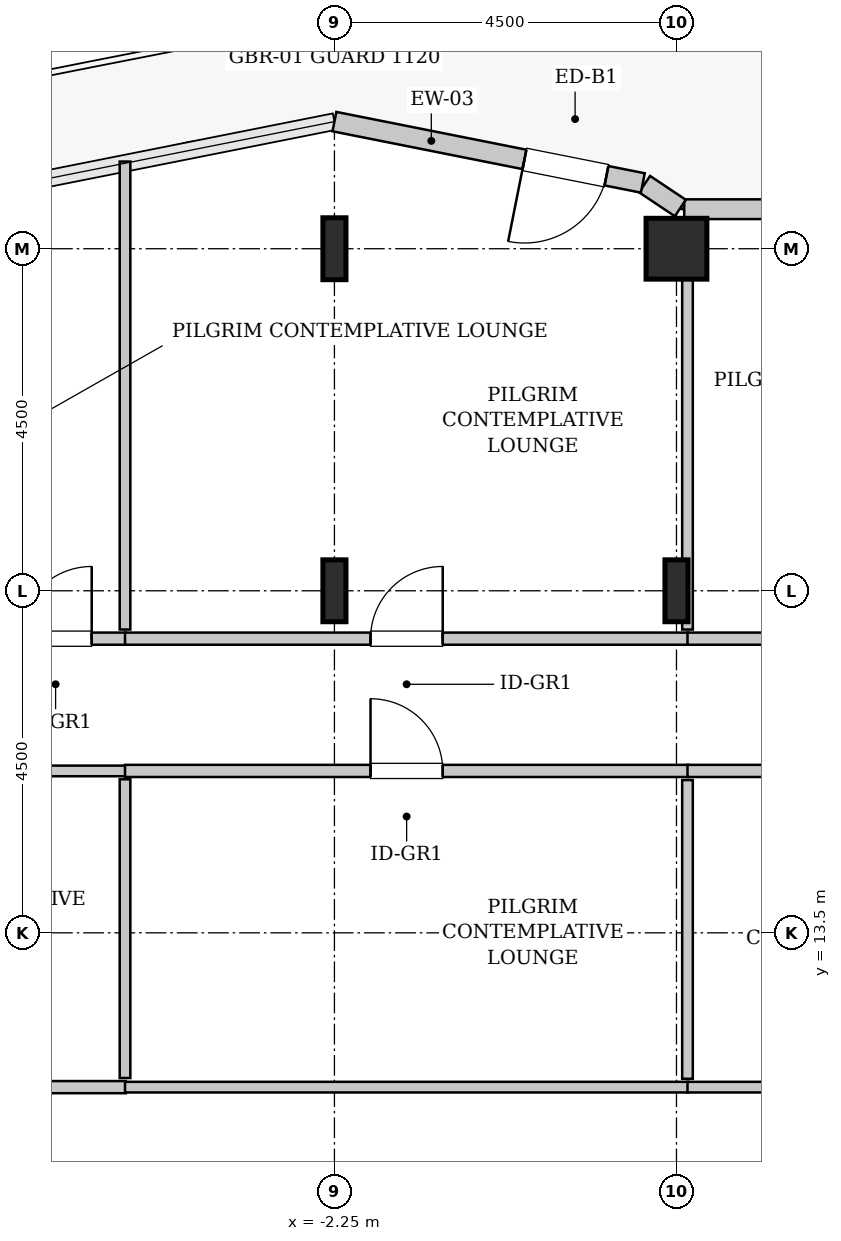
"""IFC4 building model, lengths in metres.
Left out: names, types, materials, properties, quantities, classifications, styles, units other than length and angle.
Written with IfcOpenShell. Run it as: python <this file> out.ifc"""

import sys

from ifc_helpers import new_model, si_unit, direction, frame, frame_2d, origin, origin_2d, place, context, subcontext, project, spatial, rectangle, hollow_rectangle, i_section, extrude, source, transform, mapped, element, fill, save


model = new_model("IFC4")
c1 = context("Model", 3, precision=1e-05, world=origin(), true_north=direction((0.0, 1.0)))
c2 = subcontext(c1, "Body", "Model", "MODEL_VIEW")
j1 = project(units=[si_unit("LENGTHUNIT", "METRE"), si_unit("PLANEANGLEUNIT", "RADIAN")], contexts=[c1])
p1 = place(None, origin())
s1 = spatial("IfcSite", under=j1, at=p1, CompositionType="ELEMENT")
p2 = place(p1, origin())
s2 = spatial("IfcBuilding", under=s1, at=p2, CompositionType="ELEMENT")
p3 = place(p2, frame((0.0, 0.0, 148.8)))
s3 = spatial("IfcBuildingStorey", under=s2, at=p3, CompositionType="ELEMENT", Elevation=148.8)
m1 = source(origin(), c2, "Body", "SweptSolid", [
    extrude(i_section(OverallWidth=0.303, OverallDepth=0.814, WebThickness=0.021, FlangeThickness=0.04, FilletRadius=0.03, at=origin_2d()), origin(), (0.0, 0.0, 1.0), 3.8),
])
for number, where, z_axis, x_axis in (
    (1, (-2.25, 18.0, 0.0), (0.0, 0.0, 1.0), (1.0, 0.0, 0.0)),
    (2, (-2.25, 22.5, 0.0), (0.0, 0.0, 1.0), (1.0, 0.0, 0.0)),
    (3, (2.25, 18.0, 0.0), (0.0, 0.0, 1.0), (1.0, 0.0, 0.0)),
):
    element("IfcColumn", number, at=place(p3, frame(where, z_axis=z_axis, x_axis=x_axis)), inside=s3, PredefinedType="COLUMN", context=c2, shape_type="MappedRepresentation", body=[
        mapped(m1, transform((0.0, 0.0, 0.0), x_axis=(1.0, 0.0, 0.0), y_axis=(0.0, 1.0, 0.0), z_axis=(0.0, 0.0, 1.0), scale=1.0)),
    ])
m2 = source(origin(), c2, "Body", "SweptSolid", [
    extrude(hollow_rectangle(XDim=0.8, YDim=0.8, WallThickness=0.04, InnerFilletRadius=0.04, OuterFilletRadius=0.08, at=origin_2d()), origin(), (0.0, 0.0, 1.0), 3.8),
])
p4 = place(p3, frame((2.25, 22.5, 0.0), z_axis=(0.0, 0.0, 1.0), x_axis=(1.0, 0.0, 0.0)))
e4 = element("IfcColumn", 4, at=p4, inside=s3, PredefinedType="COLUMN", context=c2, shape_type="MappedRepresentation", body=[
    mapped(m2, transform((0.0, 0.0, 0.0), x_axis=(1.0, 0.0, 0.0), y_axis=(0.0, 1.0, 0.0), z_axis=(0.0, 0.0, 1.0), scale=1.0)),
])
m3 = source(origin(), c2, "Body", "SweptSolid", [
    extrude(rectangle(XDim=1.37, YDim=0.26, at=frame_2d((0.685, 0.0))), origin(), (0.0, 0.0, 1.0), 3.55),
])
p5 = place(p3, frame((3.722, 23.02, 0.0), z_axis=(0.0, 0.0, 1.0), x_axis=(-1.0, 0.0, 0.0)))
e5 = element("IfcWall", 5, at=p5, inside=s3, PredefinedType="SOLIDWALL", context=c2, shape_type="MappedRepresentation", body=[
    mapped(m3, transform((0.0, 0.0, 0.0), x_axis=(1.0, 0.0, 0.0), y_axis=(0.0, 1.0, 0.0), z_axis=(0.0, 0.0, 1.0), scale=1.0)),
])
m4 = source(origin(), c2, "Body", "SweptSolid", [
    extrude(rectangle(XDim=0.565, YDim=0.26, at=frame_2d((0.283, 0.0))), origin(), (0.0, 0.0, 1.0), 3.55),
])
p6 = place(p3, frame((2.301, 23.036, 0.0), z_axis=(0.0, 0.0, 1.0), x_axis=(-0.831651492666, 0.555297933317, 0.0)))
e6 = element("IfcWall", 6, at=p6, inside=s3, PredefinedType="SOLIDWALL", context=c2, shape_type="MappedRepresentation", body=[
    mapped(m4, transform((0.0, 0.0, 0.0), x_axis=(1.0, 0.0, 0.0), y_axis=(0.0, 1.0, 0.0), z_axis=(0.0, 0.0, 1.0), scale=1.0)),
])
m5 = source(origin(), c2, "Body", "SweptSolid", [
    extrude(rectangle(XDim=4.137, YDim=0.26, at=frame_2d((2.068, 0.0))), origin(), (0.0, 0.0, 1.0), 3.55),
])
p7 = place(p3, frame((1.807, 23.365, 0.0), z_axis=(0.0, 0.0, 1.0), x_axis=(-0.980782170794, 0.195105954428, 0.0)))
e7 = element("IfcWall", 7, at=p7, inside=s3, PredefinedType="SOLIDWALL", context=c2, shape_type="MappedRepresentation", body=[
    mapped(m5, transform((0.0, 0.0, 0.0), x_axis=(1.0, 0.0, 0.0), y_axis=(0.0, 1.0, 0.0), z_axis=(0.0, 0.0, 1.0), scale=1.0)),
])
p8 = place(p7, frame((0.488, 0.0, 0.0)))
e8 = element("IfcOpeningElement", 8, at=p8, cuts=e7, PredefinedType="OPENING", context=c2, shape_type="SweptSolid", body=[
    extrude(rectangle(XDim=1.1, YDim=2.2, at=frame_2d((0.55, 1.1))), frame((0.0, 0.14, 0.0), z_axis=(0.0, -1.0, 0.0), x_axis=(1.0, 0.0, 0.0)), (0.0, 0.0, 1.0), 0.28),
])
m6 = source(origin(), c2, "Body", "SweptSolid", [
    extrude(rectangle(XDim=7.015, YDim=0.16, at=frame_2d((3.507, 0.0))), origin(), (0.0, 0.0, 1.0), 3.535),
])
p9 = place(p3, frame((-12.01, 11.47, 0.0), z_axis=(0.0, 0.0, 1.0), x_axis=(1.0, 0.0, 0.0)))
e9 = element("IfcWall", 9, at=p9, inside=s3, PredefinedType="PARTITIONING", context=c2, shape_type="MappedRepresentation", body=[
    mapped(m6, transform((0.0, 0.0, 0.0), x_axis=(1.0, 0.0, 0.0), y_axis=(0.0, 1.0, 0.0), z_axis=(0.0, 0.0, 1.0), scale=1.0)),
])
p10 = place(p9, frame((3.032, 0.0, 0.0)))
e10 = element("IfcOpeningElement", 10, at=p10, cuts=e9, PredefinedType="OPENING", context=c2, shape_type="SweptSolid", body=[
    extrude(rectangle(XDim=0.95, YDim=2.1, at=frame_2d((0.475, 1.05))), frame((0.0, 0.09, 0.0), z_axis=(0.0, -1.0, 0.0), x_axis=(1.0, 0.0, 0.0)), (0.0, 0.0, 1.0), 0.18),
])
m7 = source(origin(), c2, "Body", "SweptSolid", [
    extrude(rectangle(XDim=7.015, YDim=0.14, at=frame_2d((3.507, 0.0))), origin(), (0.0, 0.0, 1.0), 3.535),
])
p11 = place(p3, frame((-12.01, 15.63, 0.0), z_axis=(0.0, 0.0, 1.0), x_axis=(1.0, 0.0, 0.0)))
e11 = element("IfcWall", 11, at=p11, inside=s3, PredefinedType="PARTITIONING", context=c2, shape_type="MappedRepresentation", body=[
    mapped(m7, transform((0.0, 0.0, 0.0), x_axis=(1.0, 0.0, 0.0), y_axis=(0.0, 1.0, 0.0), z_axis=(0.0, 0.0, 1.0), scale=1.0)),
])
m8 = source(origin(), c2, "Body", "SweptSolid", [
    extrude(rectangle(XDim=3.93, YDim=0.14, at=frame_2d((1.965, 0.0))), origin(), (0.0, 0.0, 1.0), 3.535),
])
p12 = place(p3, frame((-5.005, 11.59, 0.0), z_axis=(0.0, 0.0, 1.0), x_axis=(0.0, 1.0, 0.0)))
e12 = element("IfcWall", 12, at=p12, inside=s3, PredefinedType="PARTITIONING", context=c2, shape_type="MappedRepresentation", body=[
    mapped(m8, transform((0.0, 0.0, 0.0), x_axis=(1.0, 0.0, 0.0), y_axis=(0.0, 1.0, 0.0), z_axis=(0.0, 0.0, 1.0), scale=1.0)),
])
m9 = source(origin(), c2, "Body", "SweptSolid", [
    extrude(rectangle(XDim=2.445, YDim=0.16, at=frame_2d((1.222, 0.0))), origin(), (0.0, 0.0, 1.0), 3.535),
])
p13 = place(p3, frame((-7.44, 17.37, 0.0), z_axis=(0.0, 0.0, 1.0), x_axis=(1.0, 0.0, 0.0)))
e13 = element("IfcWall", 13, at=p13, inside=s3, PredefinedType="PARTITIONING", context=c2, shape_type="MappedRepresentation", body=[
    mapped(m9, transform((0.0, 0.0, 0.0), x_axis=(1.0, 0.0, 0.0), y_axis=(0.0, 1.0, 0.0), z_axis=(0.0, 0.0, 1.0), scale=1.0)),
])
p14 = place(p13, frame((1.047, 0.0, 0.0)))
e14 = element("IfcOpeningElement", 14, at=p14, cuts=e13, PredefinedType="OPENING", context=c2, shape_type="SweptSolid", body=[
    extrude(rectangle(XDim=0.95, YDim=2.1, at=frame_2d((0.475, 1.05))), frame((0.0, 0.09, 0.0), z_axis=(0.0, -1.0, 0.0), x_axis=(1.0, 0.0, 0.0)), (0.0, 0.0, 1.0), 0.18),
])
m10 = source(origin(), c2, "Body", "SweptSolid", [
    extrude(rectangle(XDim=6.157, YDim=0.14, at=frame_2d((3.078, 0.0))), origin(), (0.0, 0.0, 1.0), 3.535),
])
p15 = place(p3, frame((-5.005, 17.49, 0.0), z_axis=(0.0, 0.0, 1.0), x_axis=(0.0, 1.0, 0.0)))
e15 = element("IfcWall", 15, at=p15, inside=s3, PredefinedType="PARTITIONING", context=c2, shape_type="MappedRepresentation", body=[
    mapped(m10, transform((0.0, 0.0, 0.0), x_axis=(1.0, 0.0, 0.0), y_axis=(0.0, 1.0, 0.0), z_axis=(0.0, 0.0, 1.0), scale=1.0)),
])
m11 = source(origin(), c2, "Body", "SweptSolid", [
    extrude(rectangle(XDim=7.41, YDim=0.16, at=frame_2d((3.705, 0.0))), origin(), (0.0, 0.0, 1.0), 3.535),
])
p16 = place(p3, frame((-5.005, 17.37, 0.0), z_axis=(0.0, 0.0, 1.0), x_axis=(1.0, 0.0, 0.0)))
e16 = element("IfcWall", 16, at=p16, inside=s3, PredefinedType="PARTITIONING", context=c2, shape_type="MappedRepresentation", body=[
    mapped(m11, transform((0.0, 0.0, 0.0), x_axis=(1.0, 0.0, 0.0), y_axis=(0.0, 1.0, 0.0), z_axis=(0.0, 0.0, 1.0), scale=1.0)),
])
p17 = place(p16, frame((3.23, 0.0, 0.0)))
e17 = element("IfcOpeningElement", 17, at=p17, cuts=e16, PredefinedType="OPENING", context=c2, shape_type="SweptSolid", body=[
    extrude(rectangle(XDim=0.95, YDim=2.1, at=frame_2d((0.475, 1.05))), frame((0.0, 0.09, 0.0), z_axis=(0.0, -1.0, 0.0), x_axis=(1.0, 0.0, 0.0)), (0.0, 0.0, 1.0), 0.18),
])
m12 = source(origin(), c2, "Body", "SweptSolid", [
    extrude(rectangle(XDim=5.36, YDim=0.14, at=frame_2d((2.68, 0.0))), origin(), (0.0, 0.0, 1.0), 2.875),
])
p18 = place(p3, frame((2.395, 17.49, 0.0), z_axis=(0.0, 0.0, 1.0), x_axis=(0.0, 1.0, 0.0)))
e18 = element("IfcWall", 18, at=p18, inside=s3, PredefinedType="PARTITIONING", context=c2, shape_type="MappedRepresentation", body=[
    mapped(m12, transform((0.0, 0.0, 0.0), x_axis=(1.0, 0.0, 0.0), y_axis=(0.0, 1.0, 0.0), z_axis=(0.0, 0.0, 1.0), scale=1.0)),
])
p19 = place(p3, frame((-5.005, 15.63, 0.0), z_axis=(0.0, 0.0, 1.0), x_axis=(1.0, 0.0, 0.0)))
e19 = element("IfcWall", 19, at=p19, inside=s3, PredefinedType="PARTITIONING", context=c2, shape_type="MappedRepresentation", body=[
    mapped(m11, transform((0.0, 0.0, 0.0), x_axis=(1.0, 0.0, 0.0), y_axis=(0.0, 1.0, 0.0), z_axis=(0.0, 0.0, 1.0), scale=1.0)),
])
p20 = place(p19, frame((3.23, 0.0, 0.0)))
e20 = element("IfcOpeningElement", 20, at=p20, cuts=e19, PredefinedType="OPENING", context=c2, shape_type="SweptSolid", body=[
    extrude(rectangle(XDim=0.95, YDim=2.1, at=frame_2d((0.475, 1.05))), frame((0.0, 0.09, 0.0), z_axis=(0.0, -1.0, 0.0), x_axis=(1.0, 0.0, 0.0)), (0.0, 0.0, 1.0), 0.18),
])
m13 = source(origin(), c2, "Body", "SweptSolid", [
    extrude(rectangle(XDim=7.41, YDim=0.14, at=frame_2d((3.705, 0.0))), origin(), (0.0, 0.0, 1.0), 3.535),
])
p21 = place(p3, frame((-5.005, 11.47, 0.0), z_axis=(0.0, 0.0, 1.0), x_axis=(1.0, 0.0, 0.0)))
e21 = element("IfcWall", 21, at=p21, inside=s3, PredefinedType="PARTITIONING", context=c2, shape_type="MappedRepresentation", body=[
    mapped(m13, transform((0.0, 0.0, 0.0), x_axis=(1.0, 0.0, 0.0), y_axis=(0.0, 1.0, 0.0), z_axis=(0.0, 0.0, 1.0), scale=1.0)),
])
p22 = place(p3, frame((2.395, 11.58, 0.0), z_axis=(0.0, 0.0, 1.0), x_axis=(0.0, 1.0, 0.0)))
e22 = element("IfcWall", 22, at=p22, inside=s3, PredefinedType="PARTITIONING", context=c2, shape_type="MappedRepresentation", body=[
    mapped(m8, transform((0.0, 0.0, 0.0), x_axis=(1.0, 0.0, 0.0), y_axis=(0.0, 1.0, 0.0), z_axis=(0.0, 0.0, 1.0), scale=1.0)),
])
m14 = source(origin(), c2, "Body", "SweptSolid", [
    extrude(rectangle(XDim=5.81, YDim=0.16, at=frame_2d((2.905, 0.0))), origin(), (0.0, 0.0, 1.0), 3.535),
])
p23 = place(p3, frame((2.395, 17.37, 0.0), z_axis=(0.0, 0.0, 1.0), x_axis=(1.0, 0.0, 0.0)))
e23 = element("IfcWall", 23, at=p23, inside=s3, PredefinedType="PARTITIONING", context=c2, shape_type="MappedRepresentation", body=[
    mapped(m14, transform((0.0, 0.0, 0.0), x_axis=(1.0, 0.0, 0.0), y_axis=(0.0, 1.0, 0.0), z_axis=(0.0, 0.0, 1.0), scale=1.0)),
])
p24 = place(p23, frame((2.43, 0.0, 0.0)))
e24 = element("IfcOpeningElement", 24, at=p24, cuts=e23, PredefinedType="OPENING", context=c2, shape_type="SweptSolid", body=[
    extrude(rectangle(XDim=0.95, YDim=2.1, at=frame_2d((0.475, 1.05))), frame((0.0, 0.09, 0.0), z_axis=(0.0, -1.0, 0.0), x_axis=(1.0, 0.0, 0.0)), (0.0, 0.0, 1.0), 0.18),
])
p25 = place(p3, frame((2.395, 15.63, 0.0), z_axis=(0.0, 0.0, 1.0), x_axis=(1.0, 0.0, 0.0)))
e25 = element("IfcWall", 25, at=p25, inside=s3, PredefinedType="PARTITIONING", context=c2, shape_type="MappedRepresentation", body=[
    mapped(m14, transform((0.0, 0.0, 0.0), x_axis=(1.0, 0.0, 0.0), y_axis=(0.0, 1.0, 0.0), z_axis=(0.0, 0.0, 1.0), scale=1.0)),
])
p26 = place(p25, frame((2.43, 0.0, 0.0)))
e26 = element("IfcOpeningElement", 26, at=p26, cuts=e25, PredefinedType="OPENING", context=c2, shape_type="SweptSolid", body=[
    extrude(rectangle(XDim=0.95, YDim=2.1, at=frame_2d((0.475, 1.05))), frame((0.0, 0.09, 0.0), z_axis=(0.0, -1.0, 0.0), x_axis=(1.0, 0.0, 0.0)), (0.0, 0.0, 1.0), 0.18),
])
m15 = source(origin(), c2, "Body", "SweptSolid", [
    extrude(rectangle(XDim=5.81, YDim=0.14, at=frame_2d((2.905, 0.0))), origin(), (0.0, 0.0, 1.0), 3.535),
])
p27 = place(p3, frame((2.395, 11.47, 0.0), z_axis=(0.0, 0.0, 1.0), x_axis=(1.0, 0.0, 0.0)))
e27 = element("IfcWall", 27, at=p27, inside=s3, PredefinedType="PARTITIONING", context=c2, shape_type="MappedRepresentation", body=[
    mapped(m15, transform((0.0, 0.0, 0.0), x_axis=(1.0, 0.0, 0.0), y_axis=(0.0, 1.0, 0.0), z_axis=(0.0, 0.0, 1.0), scale=1.0)),
])
m16 = source(origin(), c2, "Body", "SweptSolid", [
    extrude(rectangle(XDim=1.1, YDim=2.2, at=frame_2d((0.55, 1.1))), frame((0.0, 0.025, 0.0), z_axis=(0.0, -1.0, 0.0), x_axis=(1.0, 0.0, 0.0)), (0.0, 0.0, 1.0), 0.05),
])
p28 = place(p8, origin())
e28 = element("IfcDoor", 28, at=p28, inside=s3, OperationType="SINGLE_SWING_RIGHT", PredefinedType="DOOR", context=c2, shape_type="MappedRepresentation", body=[
    mapped(m16, transform((0.0, 0.0, 0.0), x_axis=(1.0, 0.0, 0.0), y_axis=(0.0, 1.0, 0.0), z_axis=(0.0, 0.0, 1.0), scale=1.0)),
])
fill(e8, e28)
m17 = source(origin(), c2, "Body", "SweptSolid", [
    extrude(rectangle(XDim=0.95, YDim=2.1, at=frame_2d((0.475, 1.05))), frame((0.0, 0.025, 0.0), z_axis=(0.0, -1.0, 0.0), x_axis=(1.0, 0.0, 0.0)), (0.0, 0.0, 1.0), 0.05),
])
p29 = place(p14, origin())
e29 = element("IfcDoor", 29, at=p29, inside=s3, OperationType="SINGLE_SWING_RIGHT", PredefinedType="DOOR", context=c2, shape_type="MappedRepresentation", body=[
    mapped(m17, transform((0.0, 0.0, 0.0), x_axis=(1.0, 0.0, 0.0), y_axis=(0.0, 1.0, 0.0), z_axis=(0.0, 0.0, 1.0), scale=1.0)),
])
fill(e14, e29)
p30 = place(p17, origin())
e30 = element("IfcDoor", 30, at=p30, inside=s3, OperationType="SINGLE_SWING_RIGHT", PredefinedType="DOOR", context=c2, shape_type="MappedRepresentation", body=[
    mapped(m17, transform((0.0, 0.0, 0.0), x_axis=(1.0, 0.0, 0.0), y_axis=(0.0, 1.0, 0.0), z_axis=(0.0, 0.0, 1.0), scale=1.0)),
])
fill(e17, e30)
p31 = place(p20, origin())
e31 = element("IfcDoor", 31, at=p31, inside=s3, OperationType="SINGLE_SWING_LEFT", PredefinedType="DOOR", context=c2, shape_type="MappedRepresentation", body=[
    mapped(m17, transform((0.0, 0.0, 0.0), x_axis=(1.0, 0.0, 0.0), y_axis=(0.0, 1.0, 0.0), z_axis=(0.0, 0.0, 1.0), scale=1.0)),
])
fill(e20, e31)
save(model, sys.argv[1])
